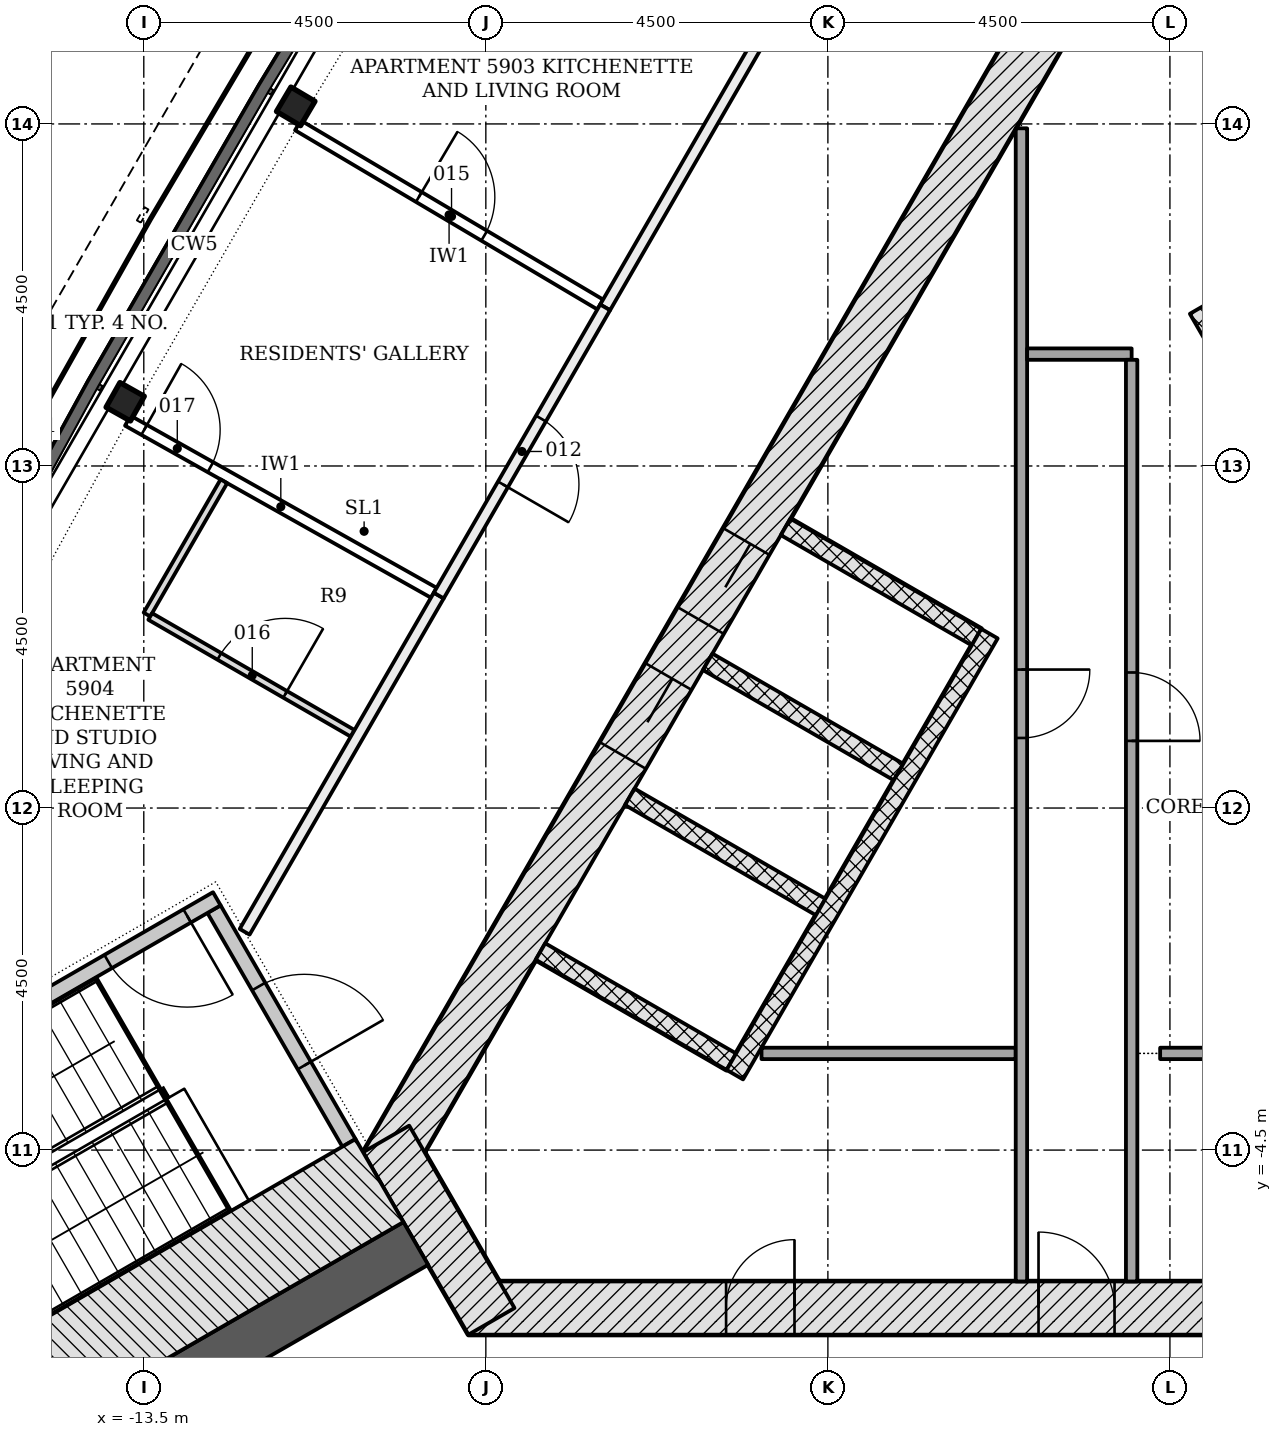
"""IFC4 building model, lengths in metres.
Left out: names, types, materials, properties, quantities, classifications, styles, units other than length and angle.
Written with IfcOpenShell. Run it as: python <this file> out.ifc"""

import sys

from ifc_helpers import new_model, si_unit, direction, frame, frame_2d, origin, origin_2d, place, context, subcontext, project, spatial, polyline, rectangle, i_section, outline, extrude, element, fill, save


model = new_model("IFC4")
c1 = context("Model", 3, precision=1e-05, world=origin(), true_north=direction((0.0, 1.0)))
c2 = subcontext(c1, "Body", "Model", "MODEL_VIEW")
j1 = project(units=[si_unit("LENGTHUNIT", "METRE"), si_unit("PLANEANGLEUNIT", "RADIAN")], contexts=[c1])
p1 = place(None, origin())
s1 = spatial("IfcSite", under=j1, at=p1, CompositionType="ELEMENT")
p2 = place(p1, origin())
s2 = spatial("IfcBuilding", under=s1, at=p2, CompositionType="ELEMENT")
p3 = place(p2, frame((0.0, 0.0, 229.2)))
s3 = spatial("IfcBuildingStorey", under=s2, at=p3, CompositionType="ELEMENT", Elevation=229.2)
p4 = place(p3, frame((-9.229, -6.578, -0.2), z_axis=(0.0, 0.0, 1.0), x_axis=(1.0, 0.0, 0.0)))
e1 = element("IfcWall", 1, at=p4, inside=s3, PredefinedType="SHEAR", context=c2, shape_type="SweptSolid", body=[
    extrude(rectangle(XDim=18.458, YDim=0.7, at=frame_2d((9.229, 0.0))), origin(), (0.0, 0.0, 1.0), 3.6),
])
p5 = place(p4, frame((7.5, 0.0, 0.2)))
e2 = element("IfcOpeningElement", 2, at=p5, cuts=e1, PredefinedType="OPENING", context=c2, shape_type="SweptSolid", body=[
    extrude(rectangle(XDim=1.0, YDim=2.1, at=frame_2d((0.5, 1.05))), frame((0.0, 0.36, 0.0), z_axis=(0.0, -1.0, 0.0), x_axis=(1.0, 0.0, 0.0)), (0.0, 0.0, 1.0), 0.72),
])
p6 = place(p4, frame((3.389, 0.0, 0.2)))
e3 = element("IfcOpeningElement", 3, at=p6, cuts=e1, PredefinedType="OPENING", context=c2, shape_type="SweptSolid", body=[
    extrude(rectangle(XDim=0.9, YDim=2.1, at=frame_2d((0.45, 1.05))), frame((0.0, 0.36, 0.0), z_axis=(0.0, -1.0, 0.0), x_axis=(1.0, 0.0, 0.0)), (0.0, 0.0, 1.0), 0.72),
])
p7 = place(p4, frame((10.363, 0.0, 0.2)))
e4 = element("IfcOpeningElement", 4, at=p7, cuts=e1, PredefinedType="OPENING", context=c2, shape_type="SweptSolid", body=[
    extrude(rectangle(XDim=1.0, YDim=2.1, at=frame_2d((0.5, 1.05))), frame((0.0, 0.36, 0.0), z_axis=(0.0, -1.0, 0.0), x_axis=(1.0, 0.0, 0.0)), (0.0, 0.0, 1.0), 0.72),
])
p8 = place(p4, frame((15.077, 0.0, 0.2)))
e5 = element("IfcOpeningElement", 5, at=p8, cuts=e1, PredefinedType="OPENING", context=c2, shape_type="SweptSolid", body=[
    extrude(rectangle(XDim=0.9, YDim=2.1, at=frame_2d((0.45, 1.05))), frame((0.0, 0.36, 0.0), z_axis=(0.0, -1.0, 0.0), x_axis=(1.0, 0.0, 0.0)), (0.0, 0.0, 1.0), 0.72),
])
p9 = place(p3, frame((-1.083, 11.281, -0.2), z_axis=(0.0, 0.0, 1.0), x_axis=(-0.500001446645, -0.866024568562, 0.0)))
e6 = element("IfcWall", 6, at=p9, inside=s3, PredefinedType="SHEAR", context=c2, shape_type="SweptSolid", body=[
    extrude(rectangle(XDim=18.458, YDim=0.7, at=frame_2d((9.229, 0.0))), origin(), (0.0, 0.0, 1.0), 3.6),
])
p10 = place(p9, frame((8.979, 0.0, 0.2)))
e7 = element("IfcOpeningElement", 7, at=p10, cuts=e6, PredefinedType="OPENING", context=c2, shape_type="SweptSolid", body=[
    extrude(rectangle(XDim=1.2, YDim=2.1, at=frame_2d((0.6, 1.05))), frame((0.0, 0.36, 0.0), z_axis=(0.0, -1.0, 0.0), x_axis=(1.0, 0.0, 0.0)), (0.0, 0.0, 1.0), 0.72),
])
p11 = place(p9, frame((11.029, 0.0, 0.2)))
e8 = element("IfcOpeningElement", 8, at=p11, cuts=e6, PredefinedType="OPENING", context=c2, shape_type="SweptSolid", body=[
    extrude(rectangle(XDim=1.2, YDim=2.1, at=frame_2d((0.6, 1.05))), frame((0.0, 0.36, 0.0), z_axis=(0.0, -1.0, 0.0), x_axis=(1.0, 0.0, 0.0)), (0.0, 0.0, 1.0), 0.72),
])
p12 = place(p3, frame((-10.311, -4.353, -0.2), z_axis=(0.0, 0.0, 1.0), x_axis=(0.500042739161, -0.866000726912, 0.0)))
e9 = element("IfcWall", 9, at=p12, inside=s3, PredefinedType="SHEAR", context=c2, shape_type="SweptSolid", body=[
    extrude(rectangle(XDim=2.771, YDim=0.7, at=frame_2d((1.386, 0.0))), origin(), (0.0, 0.0, 1.0), 3.6),
])
p13 = place(p3, frame((-9.922, -5.728, -0.2), z_axis=(0.0, 0.0, 1.0), x_axis=(-0.866026891245, -0.499997423634, 0.0)))
e10 = element("IfcWall", 10, at=p13, inside=s3, PredefinedType="SHEAR", context=c2, shape_type="SweptSolid", body=[
    extrude(rectangle(XDim=7.506, YDim=0.65, at=frame_2d((3.753, 0.0))), origin(), (0.0, 0.0, 1.0), 3.6),
])
for number, where, z_axis, x_axis in (
    (11, (-11.501, 9.231, -0.2), (0.0, 0.0, 1.0), (-0.51, -0.86, 0.0)),
    (12, (-13.745, 5.345, -0.2), (0.0, 0.0, 1.0), (-0.49, -0.872, 0.0)),
):
    element("IfcColumn", number, at=place(p3, frame(where, z_axis=z_axis, x_axis=x_axis)), inside=s3, PredefinedType="COLUMN", context=c2, shape_type="SweptSolid", body=[
        extrude(i_section(OverallWidth=0.373, OverallDepth=0.368, WebThickness=0.015, FlangeThickness=0.024, FilletRadius=0.015, at=origin_2d()), origin(), (0.0, 0.0, 1.0), 3.6),
    ])
p14 = place(p3, origin())
e13 = element("IfcWall", 13, at=p14, inside=s3, PredefinedType="NOTDEFINED", context=c2, shape_type="SweptSolid", body=[
    extrude(outline(polyline([(-18.457, -2.328), (-19.842, -5.13), (-20.323, -6.478), (-20.504, -7.898), (-20.375, -9.323), (-19.942, -10.687), (-19.227, -11.927), (-18.261, -12.983), (-17.092, -13.808), (-15.772, -14.361), (-14.364, -14.619), (-11.244, -14.82), (-11.225, -14.521), (-14.327, -14.32), (-15.686, -14.072), (-16.945, -13.544), (-18.062, -12.757), (-18.983, -11.748), (-19.666, -10.566), (-20.079, -9.264), (-20.202, -7.903), (-20.03, -6.548), (-19.565, -5.248), (-18.188, -2.46), (-18.457, -2.328)])), origin(), (0.0, 0.0, 1.0), 3.3),
])
p15 = place(p3, frame((5.87, -2.961, 0.0), z_axis=(0.0, 0.0, 1.0), x_axis=(-0.50000615651, 0.866021849293, 0.0)))
e14 = element("IfcWall", 14, at=p15, inside=s3, PredefinedType="PARTITIONING", context=c2, shape_type="SweptSolid", body=[
    extrude(rectangle(XDim=11.0, YDim=0.25, at=frame_2d((5.5, 0.0))), origin(), (0.0, 0.0, 1.0), 3.4),
])
for number, where, z_axis, x_axis in (
    (15, (-5.056, 3.699, -0.2), (0.0, 0.0, 1.0), (0.866, -0.5, 0.0)),
    (16, (-6.081, 1.923, -0.2), (0.0, 0.0, 1.0), (0.866, -0.5, 0.0)),
    (17, (-7.106, 0.148, -0.2), (0.0, 0.0, 1.0), (0.866, -0.5, 0.0)),
    (18, (-8.281, -1.887, -0.2), (0.0, 0.0, 1.0), (0.866, -0.5, 0.0)),
):
    element("IfcWall", number, at=place(p3, frame(where, z_axis=z_axis, x_axis=x_axis)), inside=s3, PredefinedType="PARTITIONING", context=c2, shape_type="SweptSolid", body=[
        extrude(rectangle(XDim=2.9, YDim=0.25, at=frame_2d((1.45, 0.0))), origin(), (0.0, 0.0, 1.0), 3.6),
    ])
p16 = place(p3, frame((-2.374, 2.294, 0.0), z_axis=(0.0, 0.0, 1.0), x_axis=(-0.500003174267, -0.866023571113, 0.0)))
e19 = element("IfcWall", 19, at=p16, inside=s3, PredefinedType="PARTITIONING", context=c2, shape_type="SweptSolid", body=[
    extrude(rectangle(XDim=6.7, YDim=0.25, at=frame_2d((3.35, 0.0))), origin(), (0.0, 0.0, 1.0), 3.4),
])
p17 = place(p3, frame((-5.373, -3.228, 0.0), z_axis=(0.0, 0.0, 1.0), x_axis=(1.0, 0.0, 0.0)))
e20 = element("IfcWall", 20, at=p17, inside=s3, PredefinedType="PARTITIONING", context=c2, shape_type="SweptSolid", body=[
    extrude(rectangle(XDim=3.344, YDim=0.15, at=frame_2d((1.672, 0.0))), origin(), (0.0, 0.0, 1.0), 3.4),
])
p18 = place(p3, frame((-1.954, 8.942, 0.0), z_axis=(0.0, 0.0, 1.0), x_axis=(0.0, -1.0, 0.0)))
e21 = element("IfcWall", 21, at=p18, inside=s3, PredefinedType="PARTITIONING", context=c2, shape_type="SweptSolid", body=[
    extrude(rectangle(XDim=15.171, YDim=0.15, at=frame_2d((7.585, 0.0))), origin(), (0.0, 0.0, 1.0), 3.4),
])
p19 = place(p18, frame((7.121, 0.0, 0.0)))
e22 = element("IfcOpeningElement", 22, at=p19, cuts=e21, PredefinedType="OPENING", context=c2, shape_type="SweptSolid", body=[
    extrude(rectangle(XDim=0.9, YDim=2.1, at=frame_2d((0.45, 1.05))), frame((0.0, 0.085, 0.0), z_axis=(0.0, -1.0, 0.0), x_axis=(1.0, 0.0, 0.0)), (0.0, 0.0, 1.0), 0.17),
])
p20 = place(p3, frame((-1.879, 5.972, 0.0), z_axis=(0.0, 0.0, 1.0), x_axis=(1.0, 0.0, 0.0)))
e23 = element("IfcWall", 23, at=p20, inside=s3, PredefinedType="PARTITIONING", context=c2, shape_type="SweptSolid", body=[
    extrude(rectangle(XDim=1.375, YDim=0.15, at=frame_2d((0.688, 0.0))), origin(), (0.0, 0.0, 1.0), 3.4),
])
p21 = place(p3, frame((-0.504, 5.897, 0.0), z_axis=(0.0, 0.0, 1.0), x_axis=(0.0, -1.0, 0.0)))
e24 = element("IfcWall", 24, at=p21, inside=s3, PredefinedType="PARTITIONING", context=c2, shape_type="SweptSolid", body=[
    extrude(rectangle(XDim=12.125, YDim=0.15, at=frame_2d((6.062, 0.0))), origin(), (0.0, 0.0, 1.0), 3.4),
])
p22 = place(p21, frame((4.114, 0.0, 0.0)))
e25 = element("IfcOpeningElement", 25, at=p22, cuts=e24, PredefinedType="OPENING", context=c2, shape_type="SweptSolid", body=[
    extrude(rectangle(XDim=0.9, YDim=2.1, at=frame_2d((0.45, 1.05))), frame((0.0, 0.085, 0.0), z_axis=(0.0, -1.0, 0.0), x_axis=(1.0, 0.0, 0.0)), (0.0, 0.0, 1.0), 0.17),
])
p23 = place(p3, frame((-0.129, -3.228, 0.0), z_axis=(0.0, 0.0, 1.0), x_axis=(1.0, 0.0, 0.0)))
e26 = element("IfcWall", 26, at=p23, inside=s3, PredefinedType="PARTITIONING", context=c2, shape_type="SweptSolid", body=[
    extrude(rectangle(XDim=9.139, YDim=0.15, at=frame_2d((4.57, 0.0))), origin(), (0.0, 0.0, 1.0), 3.4),
])
p24 = place(p3, frame((-12.576, -1.331, -0.2), z_axis=(0.0, 0.0, 1.0), x_axis=(0.499970499736, -0.8660424351, 0.0)))
e27 = element("IfcWall", 27, at=p24, inside=s3, PredefinedType="SHEAR", context=c2, shape_type="SweptSolid", body=[
    extrude(rectangle(XDim=3.55, YDim=0.2, at=frame_2d((1.775, 0.0))), origin(), (0.0, 0.0, 1.0), 3.6),
])
p25 = place(p24, frame((1.175, 0.0, 0.2)))
e28 = element("IfcOpeningElement", 28, at=p25, cuts=e27, PredefinedType="OPENING", context=c2, shape_type="SweptSolid", body=[
    extrude(rectangle(XDim=1.2, YDim=2.1, at=frame_2d((0.6, 1.05))), frame((0.0, 0.11, 0.0), z_axis=(0.0, -1.0, 0.0), x_axis=(1.0, 0.0, 0.0)), (0.0, 0.0, 1.0), 0.22),
])
p26 = place(p3, frame((-12.539, -1.194, -0.2), z_axis=(0.0, 0.0, 1.0), x_axis=(-0.866045472092, -0.499965239061, 0.0)))
e29 = element("IfcWall", 29, at=p26, inside=s3, PredefinedType="SHEAR", context=c2, shape_type="SweptSolid", body=[
    extrude(rectangle(XDim=5.6, YDim=0.2, at=frame_2d((2.8, 0.0))), origin(), (0.0, 0.0, 1.0), 3.6),
])
p27 = place(p26, frame((0.45, 0.0, 0.2)))
e30 = element("IfcOpeningElement", 30, at=p27, cuts=e29, PredefinedType="OPENING", context=c2, shape_type="SweptSolid", body=[
    extrude(rectangle(XDim=1.2, YDim=2.1, at=frame_2d((0.6, 1.05))), frame((0.0, 0.11, 0.0), z_axis=(0.0, -1.0, 0.0), x_axis=(1.0, 0.0, 0.0)), (0.0, 0.0, 1.0), 0.22),
])
p28 = place(p3, frame((-10.399, -4.901, -0.2), z_axis=(0.0, 0.0, 1.0), x_axis=(-0.866020939036, -0.500007733091, 0.0)))
e31 = element("IfcWall", 31, at=p28, inside=s3, PredefinedType="SHEAR", context=c2, shape_type="SweptSolid", body=[
    extrude(rectangle(XDim=7.507, YDim=1.261, at=frame_2d((3.753, 0.0))), origin(), (0.0, 0.0, 1.0), 3.6),
])
p29 = place(p3, frame((-0.545, 18.513, 0.0), z_axis=(0.0, 0.0, 1.0), x_axis=(-0.499998165157, -0.866026463129, 0.0)))
e32 = element("IfcWall", 32, at=p29, inside=s3, PredefinedType="PARTITIONING", context=c2, shape_type="SweptSolid", body=[
    extrude(rectangle(XDim=13.771, YDim=0.15, at=frame_2d((6.886, 0.0))), origin(), (0.0, 0.0, 1.0), 2.852),
])
p30 = place(p3, frame((-9.619, 2.795, 0.0), z_axis=(0.0, 0.0, 1.0), x_axis=(-0.499963809755, -0.866046297224, 0.0)))
e33 = element("IfcWall", 33, at=p30, inside=s3, PredefinedType="PARTITIONING", context=c2, shape_type="SweptSolid", body=[
    extrude(rectangle(XDim=5.108, YDim=0.15, at=frame_2d((2.554, 0.0))), origin(), (0.0, 0.0, 1.0), 2.852),
])
p31 = place(p3, frame((-11.472, 8.981, 0.0), z_axis=(0.0, 0.0, 1.0), x_axis=(0.860336137803, -0.509727113257, 0.0)))
e34 = element("IfcWall", 34, at=p31, inside=s3, PredefinedType="PARTITIONING", context=c2, shape_type="SweptSolid", body=[
    extrude(rectangle(XDim=4.623, YDim=0.15, at=frame_2d((2.312, 0.0))), origin(), (0.0, 0.0, 1.0), 3.4),
])
p32 = place(p31, frame((1.849, 0.0, 0.0)))
e35 = element("IfcOpeningElement", 35, at=p32, cuts=e34, PredefinedType="OPENING", context=c2, shape_type="SweptSolid", body=[
    extrude(rectangle(XDim=1.0, YDim=2.1, at=frame_2d((0.5, 1.05))), frame((0.0, 0.085, 0.0), z_axis=(0.0, -1.0, 0.0), x_axis=(1.0, 0.0, 0.0)), (0.0, 0.0, 1.0), 0.17),
])
p33 = place(p3, frame((-13.71, 5.096, 0.0), z_axis=(0.0, 0.0, 1.0), x_axis=(0.871644704197, -0.490138255644, 0.0)))
e36 = element("IfcWall", 36, at=p33, inside=s3, PredefinedType="PARTITIONING", context=c2, shape_type="SweptSolid", body=[
    extrude(rectangle(XDim=4.618, YDim=0.15, at=frame_2d((2.309, 0.0))), origin(), (0.0, 0.0, 1.0), 3.4),
])
p34 = place(p33, frame((0.247, 0.0, 0.0)))
e37 = element("IfcOpeningElement", 37, at=p34, cuts=e36, PredefinedType="OPENING", context=c2, shape_type="SweptSolid", body=[
    extrude(rectangle(XDim=1.0, YDim=2.1, at=frame_2d((0.5, 1.05))), frame((0.0, 0.085, 0.0), z_axis=(0.0, -1.0, 0.0), x_axis=(1.0, 0.0, 0.0)), (0.0, 0.0, 1.0), 0.17),
])
p35 = place(p3, frame((-7.43, 6.586, 0.0), z_axis=(0.0, 0.0, 1.0), x_axis=(-0.500037854553, -0.866003547345, 0.0)))
e38 = element("IfcWall", 38, at=p35, inside=s3, PredefinedType="PARTITIONING", context=c2, shape_type="SweptSolid", body=[
    extrude(rectangle(XDim=4.378, YDim=0.15, at=frame_2d((2.189, 0.0))), origin(), (0.0, 0.0, 1.0), 2.852),
])
p36 = place(p35, frame((1.689, 0.0, 0.0)))
e39 = element("IfcOpeningElement", 39, at=p36, cuts=e38, PredefinedType="OPENING", context=c2, shape_type="SweptSolid", body=[
    extrude(rectangle(XDim=1.0, YDim=2.1, at=frame_2d((0.5, 1.05))), frame((0.0, 0.085, 0.0), z_axis=(0.0, -1.0, 0.0), x_axis=(1.0, 0.0, 0.0)), (0.0, 0.0, 1.0), 0.17),
])
p37 = place(p3, frame((-12.446, 4.299, 0.0), z_axis=(0.0, 0.0, 1.0), x_axis=(-0.499938124251, -0.866061124818, 0.0)))
e40 = element("IfcWall", 40, at=p37, inside=s3, PredefinedType="PARTITIONING", context=c2, shape_type="SweptSolid", body=[
    extrude(rectangle(XDim=2.025, YDim=0.1, at=frame_2d((1.013, 0.0))), origin(), (0.0, 0.0, 1.0), 3.4),
])
p38 = place(p3, frame((-13.415, 2.52, 0.0), z_axis=(0.0, 0.0, 1.0), x_axis=(0.865996501658, -0.50005005661, 0.0)))
e41 = element("IfcWall", 41, at=p38, inside=s3, PredefinedType="PARTITIONING", context=c2, shape_type="SweptSolid", body=[
    extrude(rectangle(XDim=3.075, YDim=0.1, at=frame_2d((1.538, 0.0))), origin(), (0.0, 0.0, 1.0), 3.4),
])
p39 = place(p38, frame((1.05, 0.0, 0.0)))
e42 = element("IfcOpeningElement", 42, at=p39, cuts=e41, PredefinedType="OPENING", context=c2, shape_type="SweptSolid", body=[
    extrude(rectangle(XDim=1.0, YDim=2.1, at=frame_2d((0.5, 1.05))), frame((0.0, 0.06, 0.0), z_axis=(0.0, -1.0, 0.0), x_axis=(1.0, 0.0, 0.0)), (0.0, 0.0, 1.0), 0.12),
])
p40 = place(p10, origin())
e43 = element("IfcDoor", 43, at=p40, inside=s3, OperationType="DOUBLE_DOOR_SLIDING", PredefinedType="DOOR", context=c2, shape_type="SweptSolid", body=[
    extrude(rectangle(XDim=1.2, YDim=2.1, at=frame_2d((0.6, 1.05))), frame((0.0, 0.025, 0.0), z_axis=(0.0, -1.0, 0.0), x_axis=(1.0, 0.0, 0.0)), (0.0, 0.0, 1.0), 0.05),
])
fill(e7, e43)
p41 = place(p11, origin())
e44 = element("IfcDoor", 44, at=p41, inside=s3, OperationType="DOUBLE_DOOR_SLIDING", PredefinedType="DOOR", context=c2, shape_type="SweptSolid", body=[
    extrude(rectangle(XDim=1.2, YDim=2.1, at=frame_2d((0.6, 1.05))), frame((0.0, 0.025, 0.0), z_axis=(0.0, -1.0, 0.0), x_axis=(1.0, 0.0, 0.0)), (0.0, 0.0, 1.0), 0.05),
])
fill(e8, e44)
p42 = place(p5, origin())
e45 = element("IfcDoor", 45, at=p42, inside=s3, OperationType="SINGLE_SWING_LEFT", PredefinedType="DOOR", context=c2, shape_type="SweptSolid", body=[
    extrude(rectangle(XDim=1.0, YDim=2.1, at=frame_2d((0.5, 1.05))), frame((0.0, 0.075, 0.0), z_axis=(0.0, -1.0, 0.0), x_axis=(1.0, 0.0, 0.0)), (0.0, 0.0, 1.0), 0.15),
])
fill(e2, e45)
p43 = place(p6, origin())
e46 = element("IfcDoor", 46, at=p43, inside=s3, OperationType="SINGLE_SWING_RIGHT", PredefinedType="DOOR", context=c2, shape_type="SweptSolid", body=[
    extrude(rectangle(XDim=0.9, YDim=2.1, at=frame_2d((0.45, 1.05))), frame((0.0, 0.075, 0.0), z_axis=(0.0, -1.0, 0.0), x_axis=(1.0, 0.0, 0.0)), (0.0, 0.0, 1.0), 0.15),
])
fill(e3, e46)
p44 = place(p19, origin())
e47 = element("IfcDoor", 47, at=p44, inside=s3, OperationType="SINGLE_SWING_LEFT", PredefinedType="DOOR", context=c2, shape_type="SweptSolid", body=[
    extrude(rectangle(XDim=0.9, YDim=2.1, at=frame_2d((0.45, 1.05))), frame((0.0, 0.025, 0.0), z_axis=(0.0, -1.0, 0.0), x_axis=(1.0, 0.0, 0.0)), (0.0, 0.0, 1.0), 0.05),
])
fill(e22, e47)
p45 = place(p22, origin())
e48 = element("IfcDoor", 48, at=p45, inside=s3, OperationType="SINGLE_SWING_RIGHT", PredefinedType="DOOR", context=c2, shape_type="SweptSolid", body=[
    extrude(rectangle(XDim=0.9, YDim=2.1, at=frame_2d((0.45, 1.05))), frame((0.0, 0.025, 0.0), z_axis=(0.0, -1.0, 0.0), x_axis=(1.0, 0.0, 0.0)), (0.0, 0.0, 1.0), 0.05),
])
fill(e25, e48)
p46 = place(p25, origin())
e49 = element("IfcDoor", 49, at=p46, inside=s3, OperationType="SINGLE_SWING_RIGHT", PredefinedType="DOOR", context=c2, shape_type="SweptSolid", body=[
    extrude(rectangle(XDim=1.2, YDim=2.1, at=frame_2d((0.6, 1.05))), frame((0.0, 0.025, 0.0), z_axis=(0.0, -1.0, 0.0), x_axis=(1.0, 0.0, 0.0)), (0.0, 0.0, 1.0), 0.05),
])
fill(e28, e49)
p47 = place(p27, origin())
e50 = element("IfcDoor", 50, at=p47, inside=s3, OperationType="SINGLE_SWING_LEFT", PredefinedType="DOOR", context=c2, shape_type="SweptSolid", body=[
    extrude(rectangle(XDim=1.2, YDim=2.1, at=frame_2d((0.6, 1.05))), frame((0.0, 0.025, 0.0), z_axis=(0.0, -1.0, 0.0), x_axis=(1.0, 0.0, 0.0)), (0.0, 0.0, 1.0), 0.05),
])
fill(e30, e50)
p48 = place(p36, origin())
e51 = element("IfcDoor", 51, at=p48, inside=s3, OperationType="SINGLE_SWING_RIGHT", PredefinedType="DOOR", context=c2, shape_type="SweptSolid", body=[
    extrude(rectangle(XDim=1.0, YDim=2.1, at=frame_2d((0.5, 1.05))), frame((0.0, 0.025, 0.0), z_axis=(0.0, -1.0, 0.0), x_axis=(1.0, 0.0, 0.0)), (0.0, 0.0, 1.0), 0.05),
])
fill(e39, e51)
p49 = place(p32, origin())
e52 = element("IfcDoor", 52, at=p49, inside=s3, OperationType="SINGLE_SWING_LEFT", PredefinedType="DOOR", context=c2, shape_type="SweptSolid", body=[
    extrude(rectangle(XDim=1.0, YDim=2.1, at=frame_2d((0.5, 1.05))), frame((0.0, 0.025, 0.0), z_axis=(0.0, -1.0, 0.0), x_axis=(1.0, 0.0, 0.0)), (0.0, 0.0, 1.0), 0.05),
])
fill(e35, e52)
p50 = place(p39, origin())
e53 = element("IfcDoor", 53, at=p50, inside=s3, OperationType="SINGLE_SWING_RIGHT", PredefinedType="DOOR", context=c2, shape_type="SweptSolid", body=[
    extrude(rectangle(XDim=1.0, YDim=2.1, at=frame_2d((0.5, 1.05))), frame((0.0, 0.025, 0.0), z_axis=(0.0, -1.0, 0.0), x_axis=(1.0, 0.0, 0.0)), (0.0, 0.0, 1.0), 0.05),
])
fill(e42, e53)
p51 = place(p34, origin())
e54 = element("IfcDoor", 54, at=p51, inside=s3, OperationType="SINGLE_SWING_LEFT", PredefinedType="DOOR", context=c2, shape_type="SweptSolid", body=[
    extrude(rectangle(XDim=1.0, YDim=2.1, at=frame_2d((0.5, 1.05))), frame((0.0, 0.025, 0.0), z_axis=(0.0, -1.0, 0.0), x_axis=(1.0, 0.0, 0.0)), (0.0, 0.0, 1.0), 0.05),
])
fill(e37, e54)
save(model, sys.argv[1])
